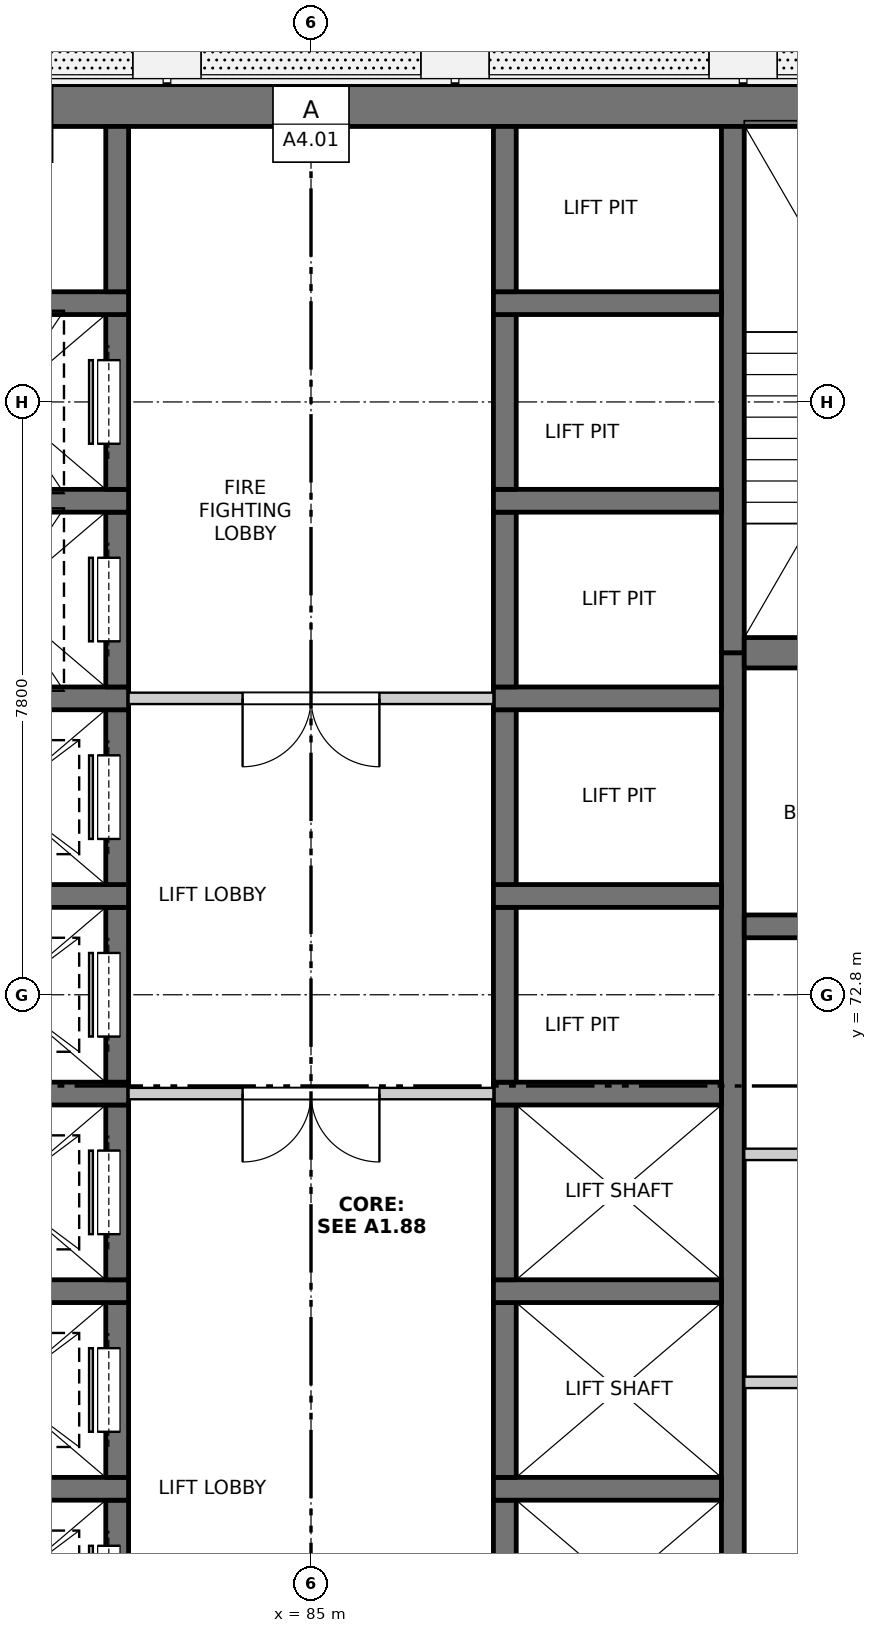
"""IFC4 building model, lengths in metres.
Left out: names, types, materials, properties, quantities, classifications, styles, units other than length and angle.
Written with IfcOpenShell. Run it as: python <this file> out.ifc"""

import sys

from ifc_helpers import new_model, si_unit, direction, frame, frame_2d, origin, place, context, subcontext, project, spatial, rectangle, extrude, element, fill, save


model = new_model("IFC4")
c1 = context("Model", 3, precision=1e-05, world=origin(), true_north=direction((0.0, 1.0)))
c2 = subcontext(c1, "Body", "Model", "MODEL_VIEW")
j1 = project(units=[si_unit("LENGTHUNIT", "METRE"), si_unit("PLANEANGLEUNIT", "RADIAN")], contexts=[c1])
p1 = place(None, origin())
s1 = spatial("IfcSite", under=j1, at=p1, CompositionType="ELEMENT")
p2 = place(p1, origin())
s2 = spatial("IfcBuilding", under=s1, at=p2, CompositionType="ELEMENT")
p3 = place(p2, frame((0.0, 0.0, 130.5)))
s3 = spatial("IfcBuildingStorey", under=s2, at=p3, CompositionType="ELEMENT", Elevation=130.5)
p4 = place(p3, frame((75.525, 84.5, -0.25), z_axis=(0.0, 0.0, 1.0), x_axis=(1.0, 0.0, 0.0)))
e1 = element("IfcWall", 1, at=p4, inside=s3, PredefinedType="SOLIDWALL", context=c2, shape_type="SweptSolid", body=[
    extrude(rectangle(XDim=18.95, YDim=0.55, at=frame_2d((9.475, 0.0))), origin(), (0.0, 0.0, 1.0), 3.4),
])
p5 = place(p3, frame((90.55, 61.95, -0.25), z_axis=(0.0, 0.0, 1.0), x_axis=(0.0, 1.0, 0.0)))
e2 = element("IfcWall", 2, at=p5, inside=s3, PredefinedType="SOLIDWALL", context=c2, shape_type="SweptSolid", body=[
    extrude(rectangle(XDim=15.35, YDim=0.3, at=frame_2d((7.675, 0.0))), origin(), (0.0, 0.0, 1.0), 3.4),
])
p6 = place(p3, frame((90.55, 77.3, -0.25), z_axis=(0.0, 0.0, 1.0), x_axis=(0.0, 1.0, 0.0)))
e3 = element("IfcWall", 3, at=p6, inside=s3, PredefinedType="SOLIDWALL", context=c2, shape_type="SweptSolid", body=[
    extrude(rectangle(XDim=6.925, YDim=0.3, at=frame_2d((3.462, 0.0))), origin(), (0.0, 0.0, 1.0), 3.4),
])
p7 = place(p3, frame((82.45, 63.85, -0.25), z_axis=(0.0, 0.0, 1.0), x_axis=(0.0, 1.0, 0.0)))
e4 = element("IfcWall", 4, at=p7, inside=s3, PredefinedType="SOLIDWALL", context=c2, shape_type="SweptSolid", body=[
    extrude(rectangle(XDim=2.3, YDim=0.3, at=frame_2d((1.15, 0.0))), origin(), (0.0, 0.0, 1.0), 3.4),
])
p8 = place(p7, frame((0.6, 0.0, 0.25)))
e5 = element("IfcOpeningElement", 5, at=p8, cuts=e4, PredefinedType="OPENING", context=c2, shape_type="SweptSolid", body=[
    extrude(rectangle(XDim=1.1, YDim=2.1, at=frame_2d((0.55, 1.05))), frame((0.0, 0.16, 0.0), z_axis=(0.0, -1.0, 0.0), x_axis=(1.0, 0.0, 0.0)), (0.0, 0.0, 1.0), 0.32),
])
p9 = place(p3, frame((79.6, 66.3, -0.25), z_axis=(0.0, 0.0, 1.0), x_axis=(1.0, 0.0, 0.0)))
e6 = element("IfcWall", 6, at=p9, inside=s3, PredefinedType="SOLIDWALL", context=c2, shape_type="SweptSolid", body=[
    extrude(rectangle(XDim=3.0, YDim=0.3, at=frame_2d((1.5, 0.0))), origin(), (0.0, 0.0, 1.0), 3.4),
])
p10 = place(p3, frame((82.45, 66.45, -0.25), z_axis=(0.0, 0.0, 1.0), x_axis=(0.0, 1.0, 0.0)))
e7 = element("IfcWall", 7, at=p10, inside=s3, PredefinedType="SOLIDWALL", context=c2, shape_type="SweptSolid", body=[
    extrude(rectangle(XDim=2.3, YDim=0.3, at=frame_2d((1.15, 0.0))), origin(), (0.0, 0.0, 1.0), 3.4),
])
p11 = place(p10, frame((0.6, 0.0, 0.25)))
e8 = element("IfcOpeningElement", 8, at=p11, cuts=e7, PredefinedType="OPENING", context=c2, shape_type="SweptSolid", body=[
    extrude(rectangle(XDim=1.1, YDim=2.1, at=frame_2d((0.55, 1.05))), frame((0.0, 0.16, 0.0), z_axis=(0.0, -1.0, 0.0), x_axis=(1.0, 0.0, 0.0)), (0.0, 0.0, 1.0), 0.32),
])
p12 = place(p3, frame((79.6, 68.9, -0.25), z_axis=(0.0, 0.0, 1.0), x_axis=(1.0, 0.0, 0.0)))
e9 = element("IfcWall", 9, at=p12, inside=s3, PredefinedType="SOLIDWALL", context=c2, shape_type="SweptSolid", body=[
    extrude(rectangle(XDim=3.0, YDim=0.3, at=frame_2d((1.5, 0.0))), origin(), (0.0, 0.0, 1.0), 3.4),
])
p13 = place(p3, frame((82.45, 69.05, -0.25), z_axis=(0.0, 0.0, 1.0), x_axis=(0.0, 1.0, 0.0)))
e10 = element("IfcWall", 10, at=p13, inside=s3, PredefinedType="SOLIDWALL", context=c2, shape_type="SweptSolid", body=[
    extrude(rectangle(XDim=2.3, YDim=0.3, at=frame_2d((1.15, 0.0))), origin(), (0.0, 0.0, 1.0), 3.4),
])
p14 = place(p13, frame((0.6, 0.0, 0.25)))
e11 = element("IfcOpeningElement", 11, at=p14, cuts=e10, PredefinedType="OPENING", context=c2, shape_type="SweptSolid", body=[
    extrude(rectangle(XDim=1.1, YDim=2.1, at=frame_2d((0.55, 1.05))), frame((0.0, 0.16, 0.0), z_axis=(0.0, -1.0, 0.0), x_axis=(1.0, 0.0, 0.0)), (0.0, 0.0, 1.0), 0.32),
])
p15 = place(p3, frame((79.6, 71.5, -0.25), z_axis=(0.0, 0.0, 1.0), x_axis=(1.0, 0.0, 0.0)))
e12 = element("IfcWall", 12, at=p15, inside=s3, PredefinedType="SOLIDWALL", context=c2, shape_type="SweptSolid", body=[
    extrude(rectangle(XDim=3.0, YDim=0.3, at=frame_2d((1.5, 0.0))), origin(), (0.0, 0.0, 1.0), 3.4),
])
p16 = place(p3, frame((82.45, 71.65, -0.25), z_axis=(0.0, 0.0, 1.0), x_axis=(0.0, 1.0, 0.0)))
e13 = element("IfcWall", 13, at=p16, inside=s3, PredefinedType="SOLIDWALL", context=c2, shape_type="SweptSolid", body=[
    extrude(rectangle(XDim=2.3, YDim=0.3, at=frame_2d((1.15, 0.0))), origin(), (0.0, 0.0, 1.0), 3.4),
])
p17 = place(p16, frame((0.6, 0.0, 0.25)))
e14 = element("IfcOpeningElement", 14, at=p17, cuts=e13, PredefinedType="OPENING", context=c2, shape_type="SweptSolid", body=[
    extrude(rectangle(XDim=1.1, YDim=2.1, at=frame_2d((0.55, 1.05))), frame((0.0, 0.16, 0.0), z_axis=(0.0, -1.0, 0.0), x_axis=(1.0, 0.0, 0.0)), (0.0, 0.0, 1.0), 0.32),
])
p18 = place(p3, frame((79.6, 74.1, -0.25), z_axis=(0.0, 0.0, 1.0), x_axis=(1.0, 0.0, 0.0)))
e15 = element("IfcWall", 15, at=p18, inside=s3, PredefinedType="SOLIDWALL", context=c2, shape_type="SweptSolid", body=[
    extrude(rectangle(XDim=3.0, YDim=0.3, at=frame_2d((1.5, 0.0))), origin(), (0.0, 0.0, 1.0), 3.4),
])
p19 = place(p3, frame((82.45, 74.25, -0.25), z_axis=(0.0, 0.0, 1.0), x_axis=(0.0, 1.0, 0.0)))
e16 = element("IfcWall", 16, at=p19, inside=s3, PredefinedType="SOLIDWALL", context=c2, shape_type="SweptSolid", body=[
    extrude(rectangle(XDim=2.3, YDim=0.3, at=frame_2d((1.15, 0.0))), origin(), (0.0, 0.0, 1.0), 3.4),
])
p20 = place(p19, frame((0.6, 0.0, 0.25)))
e17 = element("IfcOpeningElement", 17, at=p20, cuts=e16, PredefinedType="OPENING", context=c2, shape_type="SweptSolid", body=[
    extrude(rectangle(XDim=1.1, YDim=2.1, at=frame_2d((0.55, 1.05))), frame((0.0, 0.16, 0.0), z_axis=(0.0, -1.0, 0.0), x_axis=(1.0, 0.0, 0.0)), (0.0, 0.0, 1.0), 0.32),
])
p21 = place(p3, frame((79.6, 76.7, -0.25), z_axis=(0.0, 0.0, 1.0), x_axis=(1.0, 0.0, 0.0)))
e18 = element("IfcWall", 18, at=p21, inside=s3, PredefinedType="SOLIDWALL", context=c2, shape_type="SweptSolid", body=[
    extrude(rectangle(XDim=3.0, YDim=0.3, at=frame_2d((1.5, 0.0))), origin(), (0.0, 0.0, 1.0), 3.4),
])
p22 = place(p3, frame((82.45, 76.85, -0.25), z_axis=(0.0, 0.0, 1.0), x_axis=(0.0, 1.0, 0.0)))
e19 = element("IfcWall", 19, at=p22, inside=s3, PredefinedType="SOLIDWALL", context=c2, shape_type="SweptSolid", body=[
    extrude(rectangle(XDim=2.3, YDim=0.3, at=frame_2d((1.15, 0.0))), origin(), (0.0, 0.0, 1.0), 3.4),
])
p23 = place(p22, frame((0.6, 0.0, 0.25)))
e20 = element("IfcOpeningElement", 20, at=p23, cuts=e19, PredefinedType="OPENING", context=c2, shape_type="SweptSolid", body=[
    extrude(rectangle(XDim=1.1, YDim=2.1, at=frame_2d((0.55, 1.05))), frame((0.0, 0.16, 0.0), z_axis=(0.0, -1.0, 0.0), x_axis=(1.0, 0.0, 0.0)), (0.0, 0.0, 1.0), 0.32),
])
p24 = place(p3, frame((79.6, 79.3, -0.25), z_axis=(0.0, 0.0, 1.0), x_axis=(1.0, 0.0, 0.0)))
e21 = element("IfcWall", 21, at=p24, inside=s3, PredefinedType="SOLIDWALL", context=c2, shape_type="SweptSolid", body=[
    extrude(rectangle(XDim=3.0, YDim=0.3, at=frame_2d((1.5, 0.0))), origin(), (0.0, 0.0, 1.0), 3.4),
])
p25 = place(p3, frame((82.45, 79.45, -0.25), z_axis=(0.0, 0.0, 1.0), x_axis=(0.0, 1.0, 0.0)))
e22 = element("IfcWall", 22, at=p25, inside=s3, PredefinedType="SOLIDWALL", context=c2, shape_type="SweptSolid", body=[
    extrude(rectangle(XDim=2.3, YDim=0.3, at=frame_2d((1.15, 0.0))), origin(), (0.0, 0.0, 1.0), 3.4),
])
p26 = place(p25, frame((0.6, 0.0, 0.25)))
e23 = element("IfcOpeningElement", 23, at=p26, cuts=e22, PredefinedType="OPENING", context=c2, shape_type="SweptSolid", body=[
    extrude(rectangle(XDim=1.1, YDim=2.1, at=frame_2d((0.55, 1.05))), frame((0.0, 0.16, 0.0), z_axis=(0.0, -1.0, 0.0), x_axis=(1.0, 0.0, 0.0)), (0.0, 0.0, 1.0), 0.32),
])
p27 = place(p3, frame((79.6, 81.9, -0.25), z_axis=(0.0, 0.0, 1.0), x_axis=(1.0, 0.0, 0.0)))
e24 = element("IfcWall", 24, at=p27, inside=s3, PredefinedType="SOLIDWALL", context=c2, shape_type="SweptSolid", body=[
    extrude(rectangle(XDim=3.0, YDim=0.3, at=frame_2d((1.5, 0.0))), origin(), (0.0, 0.0, 1.0), 3.4),
])
p28 = place(p3, frame((82.45, 82.05, -0.25), z_axis=(0.0, 0.0, 1.0), x_axis=(0.0, 1.0, 0.0)))
e25 = element("IfcWall", 25, at=p28, inside=s3, PredefinedType="SOLIDWALL", context=c2, shape_type="SweptSolid", body=[
    extrude(rectangle(XDim=2.175, YDim=0.3, at=frame_2d((1.087, 0.0))), origin(), (0.0, 0.0, 1.0), 3.4),
])
p29 = place(p3, frame((87.55, 63.85, -0.25), z_axis=(0.0, 0.0, 1.0), x_axis=(0.0, 1.0, 0.0)))
e26 = element("IfcWall", 26, at=p29, inside=s3, PredefinedType="SOLIDWALL", context=c2, shape_type="SweptSolid", body=[
    extrude(rectangle(XDim=2.3, YDim=0.3, at=frame_2d((1.15, 0.0))), origin(), (0.0, 0.0, 1.0), 3.4),
])
p30 = place(p3, frame((87.4, 66.3, -0.25), z_axis=(0.0, 0.0, 1.0), x_axis=(1.0, 0.0, 0.0)))
e27 = element("IfcWall", 27, at=p30, inside=s3, PredefinedType="SOLIDWALL", context=c2, shape_type="SweptSolid", body=[
    extrude(rectangle(XDim=3.0, YDim=0.3, at=frame_2d((1.5, 0.0))), origin(), (0.0, 0.0, 1.0), 3.4),
])
p31 = place(p3, frame((87.55, 66.45, -0.25), z_axis=(0.0, 0.0, 1.0), x_axis=(0.0, 1.0, 0.0)))
e28 = element("IfcWall", 28, at=p31, inside=s3, PredefinedType="SOLIDWALL", context=c2, shape_type="SweptSolid", body=[
    extrude(rectangle(XDim=2.3, YDim=0.3, at=frame_2d((1.15, 0.0))), origin(), (0.0, 0.0, 1.0), 3.4),
])
p32 = place(p3, frame((87.4, 68.9, -0.25), z_axis=(0.0, 0.0, 1.0), x_axis=(1.0, 0.0, 0.0)))
e29 = element("IfcWall", 29, at=p32, inside=s3, PredefinedType="SOLIDWALL", context=c2, shape_type="SweptSolid", body=[
    extrude(rectangle(XDim=3.0, YDim=0.3, at=frame_2d((1.5, 0.0))), origin(), (0.0, 0.0, 1.0), 3.4),
])
p33 = place(p3, frame((87.55, 69.05, -0.25), z_axis=(0.0, 0.0, 1.0), x_axis=(0.0, 1.0, 0.0)))
e30 = element("IfcWall", 30, at=p33, inside=s3, PredefinedType="SOLIDWALL", context=c2, shape_type="SweptSolid", body=[
    extrude(rectangle(XDim=2.3, YDim=0.3, at=frame_2d((1.15, 0.0))), origin(), (0.0, 0.0, 1.0), 3.4),
])
p34 = place(p3, frame((87.4, 71.5, -0.25), z_axis=(0.0, 0.0, 1.0), x_axis=(1.0, 0.0, 0.0)))
e31 = element("IfcWall", 31, at=p34, inside=s3, PredefinedType="SOLIDWALL", context=c2, shape_type="SweptSolid", body=[
    extrude(rectangle(XDim=3.0, YDim=0.3, at=frame_2d((1.5, 0.0))), origin(), (0.0, 0.0, 1.0), 3.4),
])
p35 = place(p3, frame((87.55, 71.65, -0.25), z_axis=(0.0, 0.0, 1.0), x_axis=(0.0, 1.0, 0.0)))
e32 = element("IfcWall", 32, at=p35, inside=s3, PredefinedType="SOLIDWALL", context=c2, shape_type="SweptSolid", body=[
    extrude(rectangle(XDim=2.3, YDim=0.3, at=frame_2d((1.15, 0.0))), origin(), (0.0, 0.0, 1.0), 3.4),
])
p36 = place(p3, frame((87.4, 74.1, -0.25), z_axis=(0.0, 0.0, 1.0), x_axis=(1.0, 0.0, 0.0)))
e33 = element("IfcWall", 33, at=p36, inside=s3, PredefinedType="SOLIDWALL", context=c2, shape_type="SweptSolid", body=[
    extrude(rectangle(XDim=3.0, YDim=0.3, at=frame_2d((1.5, 0.0))), origin(), (0.0, 0.0, 1.0), 3.4),
])
p37 = place(p3, frame((87.55, 74.25, -0.25), z_axis=(0.0, 0.0, 1.0), x_axis=(0.0, 1.0, 0.0)))
e34 = element("IfcWall", 34, at=p37, inside=s3, PredefinedType="SOLIDWALL", context=c2, shape_type="SweptSolid", body=[
    extrude(rectangle(XDim=2.3, YDim=0.3, at=frame_2d((1.15, 0.0))), origin(), (0.0, 0.0, 1.0), 3.4),
])
p38 = place(p3, frame((87.4, 76.7, -0.25), z_axis=(0.0, 0.0, 1.0), x_axis=(1.0, 0.0, 0.0)))
e35 = element("IfcWall", 35, at=p38, inside=s3, PredefinedType="SOLIDWALL", context=c2, shape_type="SweptSolid", body=[
    extrude(rectangle(XDim=3.0, YDim=0.3, at=frame_2d((1.5, 0.0))), origin(), (0.0, 0.0, 1.0), 3.4),
])
p39 = place(p3, frame((87.55, 76.85, -0.25), z_axis=(0.0, 0.0, 1.0), x_axis=(0.0, 1.0, 0.0)))
e36 = element("IfcWall", 36, at=p39, inside=s3, PredefinedType="SOLIDWALL", context=c2, shape_type="SweptSolid", body=[
    extrude(rectangle(XDim=2.3, YDim=0.3, at=frame_2d((1.15, 0.0))), origin(), (0.0, 0.0, 1.0), 3.4),
])
p40 = place(p3, frame((87.4, 79.3, -0.25), z_axis=(0.0, 0.0, 1.0), x_axis=(1.0, 0.0, 0.0)))
e37 = element("IfcWall", 37, at=p40, inside=s3, PredefinedType="SOLIDWALL", context=c2, shape_type="SweptSolid", body=[
    extrude(rectangle(XDim=3.0, YDim=0.3, at=frame_2d((1.5, 0.0))), origin(), (0.0, 0.0, 1.0), 3.4),
])
p41 = place(p3, frame((87.55, 79.45, -0.25), z_axis=(0.0, 0.0, 1.0), x_axis=(0.0, 1.0, 0.0)))
e38 = element("IfcWall", 38, at=p41, inside=s3, PredefinedType="SOLIDWALL", context=c2, shape_type="SweptSolid", body=[
    extrude(rectangle(XDim=2.3, YDim=0.3, at=frame_2d((1.15, 0.0))), origin(), (0.0, 0.0, 1.0), 3.4),
])
p42 = place(p3, frame((87.4, 81.9, -0.25), z_axis=(0.0, 0.0, 1.0), x_axis=(1.0, 0.0, 0.0)))
e39 = element("IfcWall", 39, at=p42, inside=s3, PredefinedType="SOLIDWALL", context=c2, shape_type="SweptSolid", body=[
    extrude(rectangle(XDim=3.0, YDim=0.3, at=frame_2d((1.5, 0.0))), origin(), (0.0, 0.0, 1.0), 3.4),
])
p43 = place(p3, frame((87.55, 82.05, -0.25), z_axis=(0.0, 0.0, 1.0), x_axis=(0.0, 1.0, 0.0)))
e40 = element("IfcWall", 40, at=p43, inside=s3, PredefinedType="SOLIDWALL", context=c2, shape_type="SweptSolid", body=[
    extrude(rectangle(XDim=2.175, YDim=0.3, at=frame_2d((1.087, 0.0))), origin(), (0.0, 0.0, 1.0), 3.4),
])
p44 = place(p3, frame((90.7, 73.7, -0.25), z_axis=(0.0, 0.0, 1.0), x_axis=(1.0, 0.0, 0.0)))
e41 = element("IfcWall", 41, at=p44, inside=s3, PredefinedType="SOLIDWALL", context=c2, shape_type="SweptSolid", body=[
    extrude(rectangle(XDim=3.775, YDim=0.3, at=frame_2d((1.888, 0.0))), origin(), (0.0, 0.0, 1.0), 3.4),
])
p45 = place(p3, frame((90.7, 77.3, -0.25), z_axis=(0.0, 0.0, 1.0), x_axis=(1.0, 0.0, 0.0)))
e42 = element("IfcWall", 42, at=p45, inside=s3, PredefinedType="SOLIDWALL", context=c2, shape_type="SweptSolid", body=[
    extrude(rectangle(XDim=3.775, YDim=0.4, at=frame_2d((1.888, 0.0))), origin(), (0.0, 0.0, 1.0), 3.4),
])
for number, where, z_axis, x_axis in (
    (43, (90.7, 67.7, 0.0), (0.0, 0.0, 1.0), (1.0, 0.0, 0.0)),
    (44, (90.7, 70.7, 0.0), (0.0, 0.0, 1.0), (1.0, 0.0, 0.0)),
):
    element("IfcWall", number, at=place(p3, frame(where, z_axis=z_axis, x_axis=x_axis)), inside=s3, PredefinedType="PARTITIONING", context=c2, shape_type="SweptSolid", body=[
        extrude(rectangle(XDim=3.775, YDim=0.15, at=frame_2d((1.887, 0.0))), origin(), (0.0, 0.0, 1.0), 3.15),
    ])
p46 = place(p3, frame((82.6, 71.5, 0.0), z_axis=(0.0, 0.0, 1.0), x_axis=(1.0, 0.0, 0.0)))
e45 = element("IfcWall", 45, at=p46, inside=s3, PredefinedType="PARTITIONING", context=c2, shape_type="SweptSolid", body=[
    extrude(rectangle(XDim=4.8, YDim=0.15, at=frame_2d((2.4, 0.0))), origin(), (0.0, 0.0, 1.0), 3.15),
])
p47 = place(p46, frame((1.5, 0.0, 0.0)))
e46 = element("IfcOpeningElement", 46, at=p47, cuts=e45, PredefinedType="OPENING", context=c2, shape_type="SweptSolid", body=[
    extrude(rectangle(XDim=1.8, YDim=2.1, at=frame_2d((0.9, 1.05))), frame((0.0, 0.085, 0.0), z_axis=(0.0, -1.0, 0.0), x_axis=(1.0, 0.0, 0.0)), (0.0, 0.0, 1.0), 0.17),
])
p48 = place(p3, frame((82.6, 76.7, 0.0), z_axis=(0.0, 0.0, 1.0), x_axis=(1.0, 0.0, 0.0)))
e47 = element("IfcWall", 47, at=p48, inside=s3, PredefinedType="PARTITIONING", context=c2, shape_type="SweptSolid", body=[
    extrude(rectangle(XDim=4.8, YDim=0.15, at=frame_2d((2.4, 0.0))), origin(), (0.0, 0.0, 1.0), 3.15),
])
p49 = place(p48, frame((1.5, 0.0, 0.0)))
e48 = element("IfcOpeningElement", 48, at=p49, cuts=e47, PredefinedType="OPENING", context=c2, shape_type="SweptSolid", body=[
    extrude(rectangle(XDim=1.8, YDim=2.1, at=frame_2d((0.9, 1.05))), frame((0.0, 0.085, 0.0), z_axis=(0.0, -1.0, 0.0), x_axis=(1.0, 0.0, 0.0)), (0.0, 0.0, 1.0), 0.17),
])
p50 = place(p8, origin())
e49 = element("IfcDoor", 49, at=p50, inside=s3, OperationType="SLIDING_TO_RIGHT", PredefinedType="DOOR", context=c2, shape_type="SweptSolid", body=[
    extrude(rectangle(XDim=1.1, YDim=2.1, at=frame_2d((0.55, 1.05))), frame((0.0, 0.135, 0.0), z_axis=(0.0, -1.0, 0.0), x_axis=(1.0, 0.0, 0.0)), (0.0, 0.0, 1.0), 0.05),
])
fill(e5, e49)
p51 = place(p11, origin())
e50 = element("IfcDoor", 50, at=p51, inside=s3, OperationType="SLIDING_TO_RIGHT", PredefinedType="DOOR", context=c2, shape_type="SweptSolid", body=[
    extrude(rectangle(XDim=1.1, YDim=2.1, at=frame_2d((0.55, 1.05))), frame((0.0, 0.135, 0.0), z_axis=(0.0, -1.0, 0.0), x_axis=(1.0, 0.0, 0.0)), (0.0, 0.0, 1.0), 0.05),
])
fill(e8, e50)
p52 = place(p14, origin())
e51 = element("IfcDoor", 51, at=p52, inside=s3, OperationType="SLIDING_TO_LEFT", PredefinedType="DOOR", context=c2, shape_type="SweptSolid", body=[
    extrude(rectangle(XDim=1.1, YDim=2.1, at=frame_2d((0.55, 1.05))), frame((0.0, 0.135, 0.0), z_axis=(0.0, -1.0, 0.0), x_axis=(1.0, 0.0, 0.0)), (0.0, 0.0, 1.0), 0.05),
])
fill(e11, e51)
p53 = place(p47, origin())
e52 = element("IfcDoor", 52, at=p53, inside=s3, OperationType="DOUBLE_DOOR_SINGLE_SWING", PredefinedType="DOOR", context=c2, shape_type="SweptSolid", body=[
    extrude(rectangle(XDim=1.8, YDim=2.1, at=frame_2d((0.9, 1.05))), frame((0.0, 0.025, 0.0), z_axis=(0.0, -1.0, 0.0), x_axis=(1.0, 0.0, 0.0)), (0.0, 0.0, 1.0), 0.05),
])
fill(e46, e52)
p54 = place(p17, origin())
e53 = element("IfcDoor", 53, at=p54, inside=s3, OperationType="SLIDING_TO_LEFT", PredefinedType="DOOR", context=c2, shape_type="SweptSolid", body=[
    extrude(rectangle(XDim=1.1, YDim=2.1, at=frame_2d((0.55, 1.05))), frame((0.0, 0.135, 0.0), z_axis=(0.0, -1.0, 0.0), x_axis=(1.0, 0.0, 0.0)), (0.0, 0.0, 1.0), 0.05),
])
fill(e14, e53)
p55 = place(p20, origin())
e54 = element("IfcDoor", 54, at=p55, inside=s3, OperationType="SLIDING_TO_LEFT", PredefinedType="DOOR", context=c2, shape_type="SweptSolid", body=[
    extrude(rectangle(XDim=1.1, YDim=2.1, at=frame_2d((0.55, 1.05))), frame((0.0, 0.135, 0.0), z_axis=(0.0, -1.0, 0.0), x_axis=(1.0, 0.0, 0.0)), (0.0, 0.0, 1.0), 0.05),
])
fill(e17, e54)
p56 = place(p49, origin())
e55 = element("IfcDoor", 55, at=p56, inside=s3, OperationType="DOUBLE_DOOR_SINGLE_SWING", PredefinedType="DOOR", context=c2, shape_type="SweptSolid", body=[
    extrude(rectangle(XDim=1.8, YDim=2.1, at=frame_2d((0.9, 1.05))), frame((0.0, 0.025, 0.0), z_axis=(0.0, -1.0, 0.0), x_axis=(1.0, 0.0, 0.0)), (0.0, 0.0, 1.0), 0.05),
])
fill(e48, e55)
p57 = place(p23, origin())
e56 = element("IfcDoor", 56, at=p57, inside=s3, OperationType="SLIDING_TO_LEFT", PredefinedType="DOOR", context=c2, shape_type="SweptSolid", body=[
    extrude(rectangle(XDim=1.1, YDim=2.1, at=frame_2d((0.55, 1.05))), frame((0.0, 0.135, 0.0), z_axis=(0.0, -1.0, 0.0), x_axis=(1.0, 0.0, 0.0)), (0.0, 0.0, 1.0), 0.05),
])
fill(e20, e56)
p58 = place(p26, origin())
e57 = element("IfcDoor", 57, at=p58, inside=s3, OperationType="SLIDING_TO_LEFT", PredefinedType="DOOR", context=c2, shape_type="SweptSolid", body=[
    extrude(rectangle(XDim=1.1, YDim=2.1, at=frame_2d((0.55, 1.05))), frame((0.0, 0.135, 0.0), z_axis=(0.0, -1.0, 0.0), x_axis=(1.0, 0.0, 0.0)), (0.0, 0.0, 1.0), 0.05),
])
fill(e23, e57)
save(model, sys.argv[1])
